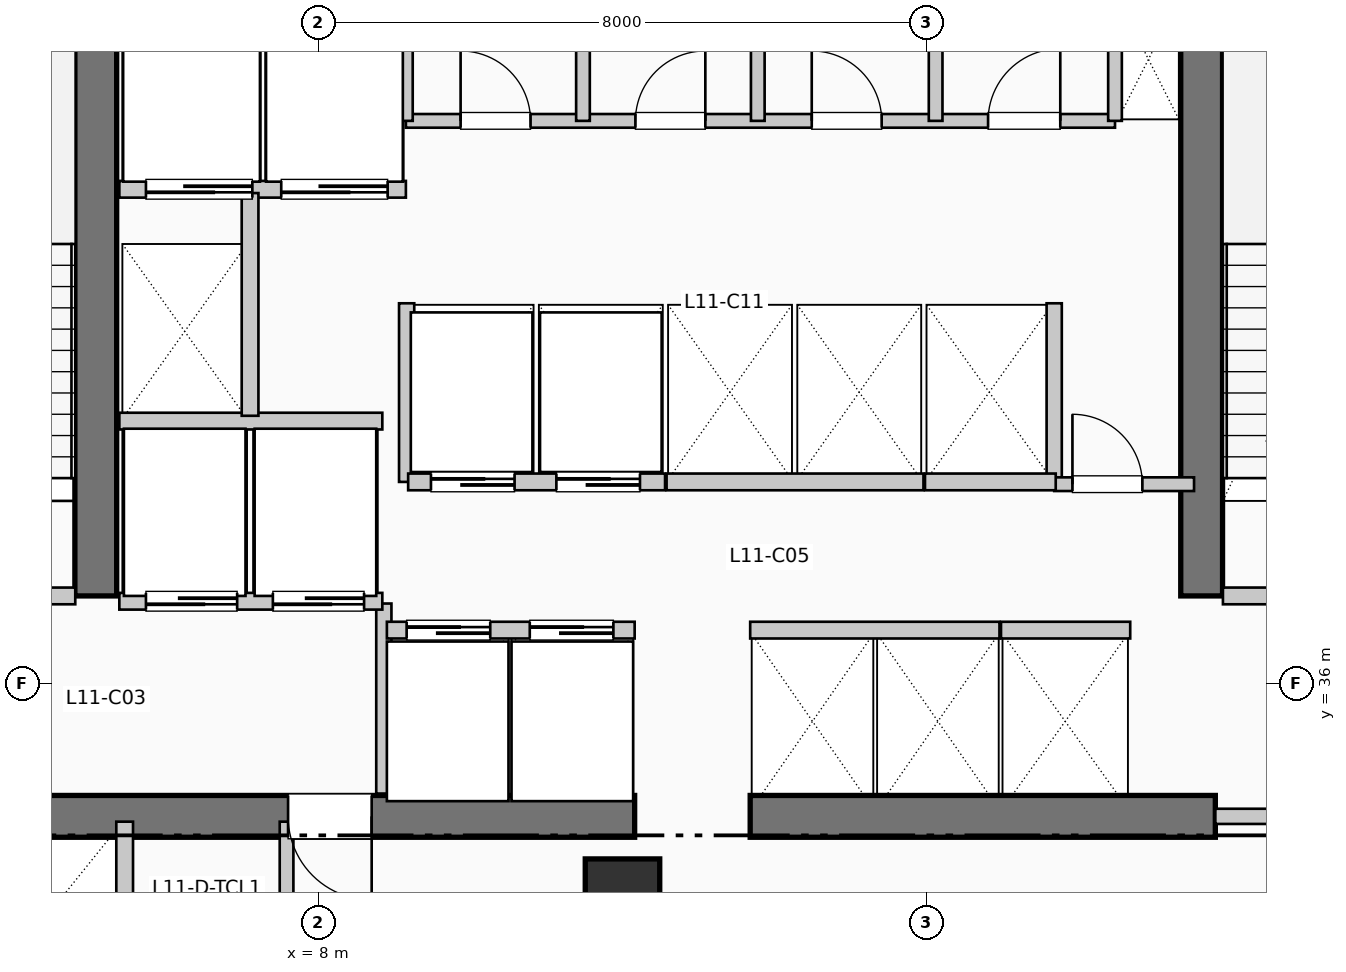
"""IFC4 building model, lengths in metres.
Left out: names, types, materials, properties, quantities, classifications, styles, units other than length and angle.
Written with IfcOpenShell. Run it as: python <this file> out.ifc"""

import sys

from ifc_helpers import new_model, si_unit, direction, frame, frame_2d, origin, origin_2d, place, context, subcontext, project, spatial, rectangle, extrude, element, fill, save


model = new_model("IFC4")
c1 = context("Model", 3, precision=1e-05, world=origin(), true_north=direction((0.0, 1.0)))
c2 = subcontext(c1, "Body", "Model", "MODEL_VIEW")
j1 = project(units=[si_unit("LENGTHUNIT", "METRE"), si_unit("PLANEANGLEUNIT", "RADIAN")], contexts=[c1])
p1 = place(None, origin())
s1 = spatial("IfcSite", under=j1, at=p1, CompositionType="ELEMENT")
p2 = place(p1, origin())
s2 = spatial("IfcBuilding", under=s1, at=p2, CompositionType="ELEMENT")
p3 = place(p2, frame((0.0, 0.0, 50.16)))
s3 = spatial("IfcBuildingStorey", under=s2, at=p3, CompositionType="ELEMENT", Elevation=50.16)
p4 = place(p3, frame((1.45, 34.25, 0.0), z_axis=(0.0, 0.0, 1.0), x_axis=(1.0, 0.0, 0.0)))
e1 = element("IfcWall", 1, at=p4, inside=s3, PredefinedType="SHEAR", context=c2, shape_type="SweptSolid", body=[
    extrude(rectangle(XDim=10.71, YDim=0.55, at=frame_2d((5.355, 0.0))), origin(), (0.0, 0.0, 1.0), 3.96),
])
p5 = place(p4, frame((7.25, 0.0, 0.0), z_axis=(0.0, 0.0, 1.0), x_axis=(-1.0, 0.0, 0.0)))
e2 = element("IfcOpeningElement", 2, at=p5, cuts=e1, PredefinedType="OPENING", context=c2, shape_type="SweptSolid", body=[
    extrude(rectangle(XDim=1.1, YDim=2.15, at=frame_2d((0.55, 1.075))), frame((0.0, 0.285, 0.0), z_axis=(0.0, -1.0, 0.0), x_axis=(1.0, 0.0, 0.0)), (0.0, 0.0, 1.0), 0.57),
])
p6 = place(p3, frame((13.68, 34.25, 0.0), z_axis=(0.0, 0.0, 1.0), x_axis=(1.0, 0.0, 0.0)))
e3 = element("IfcWall", 3, at=p6, inside=s3, PredefinedType="SHEAR", context=c2, shape_type="SweptSolid", body=[
    extrude(rectangle(XDim=6.12, YDim=0.55, at=frame_2d((3.06, 0.0))), origin(), (0.0, 0.0, 1.0), 3.96),
])
for number, where, z_axis, x_axis in (
    (4, (5.07, 37.15, 0.0), (0.0, 0.0, 1.0), (0.0, 1.0, 0.0)),
    (5, (19.62, 37.15, 0.0), (0.0, 0.0, 1.0), (0.0, 1.0, 0.0)),
):
    element("IfcWall", number, at=place(p3, frame(where, z_axis=z_axis, x_axis=x_axis)), inside=s3, PredefinedType="SHEAR", context=c2, shape_type="SweptSolid", body=[
        extrude(rectangle(XDim=7.89, YDim=0.55, at=frame_2d((3.945, 0.0))), origin(), (0.0, 0.0, 1.0), 3.96),
    ])
p7 = place(p3, frame((12.0, 33.2, 0.0), z_axis=(0.0, 0.0, 1.0), x_axis=(1.0, 0.0, 0.0)))
e6 = element("IfcColumn", 6, at=p7, inside=s3, PredefinedType="COLUMN", context=c2, shape_type="SweptSolid", body=[
    extrude(rectangle(XDim=0.98, YDim=0.98, at=origin_2d()), origin(), (0.0, 0.0, 1.0), 3.96),
])
p8 = place(p3, frame((1.65, 37.15, 0.0), z_axis=(0.0, 0.0, 1.0), x_axis=(1.0, 0.0, 0.0)))
e7 = element("IfcWall", 7, at=p8, inside=s3, PredefinedType="PARTITIONING", context=c2, shape_type="SweptSolid", body=[
    extrude(rectangle(XDim=3.15, YDim=0.22, at=frame_2d((1.575, 0.0))), origin(), (0.0, 0.0, 1.0), 3.71),
])
p9 = place(p8, frame((2.05, 0.0, 0.0), z_axis=(0.0, 0.0, 1.0), x_axis=(-1.0, 0.0, 0.0)))
e8 = element("IfcOpeningElement", 8, at=p9, cuts=e7, PredefinedType="OPENING", context=c2, shape_type="SweptSolid", body=[
    extrude(rectangle(XDim=1.05, YDim=2.15, at=frame_2d((0.525, 1.075))), frame((0.0, 0.12, 0.0), z_axis=(0.0, -1.0, 0.0), x_axis=(1.0, 0.0, 0.0)), (0.0, 0.0, 1.0), 0.24),
])
p10 = place(p3, frame((8.86, 34.55, 0.0), z_axis=(0.0, 0.0, 1.0), x_axis=(0.0, 1.0, 0.0)))
e9 = element("IfcWall", 9, at=p10, inside=s3, PredefinedType="PARTITIONING", context=c2, shape_type="SweptSolid", body=[
    extrude(rectangle(XDim=2.5, YDim=0.2, at=frame_2d((1.25, 0.0))), origin(), (0.0, 0.0, 1.0), 3.71),
])
p11 = place(p3, frame((19.9, 37.15, 0.0), z_axis=(0.0, 0.0, 1.0), x_axis=(1.0, 0.0, 0.0)))
e10 = element("IfcWall", 10, at=p11, inside=s3, PredefinedType="PARTITIONING", context=c2, shape_type="SweptSolid", body=[
    extrude(rectangle(XDim=3.15, YDim=0.22, at=frame_2d((1.575, 0.0))), origin(), (0.0, 0.0, 1.0), 3.71),
])
p12 = place(p11, frame((2.05, 0.0, 0.0), z_axis=(0.0, 0.0, 1.0), x_axis=(-1.0, 0.0, 0.0)))
e11 = element("IfcOpeningElement", 11, at=p12, cuts=e10, PredefinedType="OPENING", context=c2, shape_type="SweptSolid", body=[
    extrude(rectangle(XDim=1.05, YDim=2.15, at=frame_2d((0.525, 1.075))), frame((0.0, 0.12, 0.0), z_axis=(0.0, -1.0, 0.0), x_axis=(1.0, 0.0, 0.0)), (0.0, 0.0, 1.0), 0.24),
])
p13 = place(p3, frame((19.8, 34.25, 0.0), z_axis=(0.0, 0.0, 1.0), x_axis=(1.0, 0.0, 0.0)))
e12 = element("IfcWall", 12, at=p13, inside=s3, PredefinedType="PARTITIONING", context=c2, shape_type="SweptSolid", body=[
    extrude(rectangle(XDim=3.25, YDim=0.2, at=frame_2d((1.625, 0.0))), origin(), (0.0, 0.0, 1.0), 3.71),
])
p14 = place(p13, frame((2.15, 0.0, 0.0), z_axis=(0.0, 0.0, 1.0), x_axis=(-1.0, 0.0, 0.0)))
e13 = element("IfcOpeningElement", 13, at=p14, cuts=e12, PredefinedType="OPENING", context=c2, shape_type="SweptSolid", body=[
    extrude(rectangle(XDim=1.1, YDim=2.15, at=frame_2d((0.55, 1.075))), frame((0.0, 0.11, 0.0), z_axis=(0.0, -1.0, 0.0), x_axis=(1.0, 0.0, 0.0)), (0.0, 0.0, 1.0), 0.22),
])
p15 = place(p3, frame((5.38, 37.08, 0.0), z_axis=(0.0, 0.0, 1.0), x_axis=(1.0, 0.0, 0.0)))
e14 = element("IfcWall", 14, at=p15, inside=s3, PredefinedType="PARTITIONING", context=c2, shape_type="SweptSolid", body=[
    extrude(rectangle(XDim=3.46, YDim=0.22, at=frame_2d((1.73, 0.0))), origin(), (0.0, 0.0, 1.0), 3.71),
])
p16 = place(p15, frame((1.55, 0.0, 0.0), z_axis=(0.0, 0.0, 1.0), x_axis=(-1.0, 0.0, 0.0)))
e15 = element("IfcOpeningElement", 15, at=p16, cuts=e14, PredefinedType="OPENING", context=c2, shape_type="SweptSolid", body=[
    extrude(rectangle(XDim=1.2, YDim=2.2, at=frame_2d((0.6, 1.1))), frame((0.0, 0.12, 0.0), z_axis=(0.0, -1.0, 0.0), x_axis=(1.0, 0.0, 0.0)), (0.0, 0.0, 1.0), 0.24),
])
p17 = place(p15, frame((3.22, 0.0, 0.0), z_axis=(0.0, 0.0, 1.0), x_axis=(-1.0, 0.0, 0.0)))
e16 = element("IfcOpeningElement", 16, at=p17, cuts=e14, PredefinedType="OPENING", context=c2, shape_type="SweptSolid", body=[
    extrude(rectangle(XDim=1.2, YDim=2.2, at=frame_2d((0.6, 1.1))), frame((0.0, 0.12, 0.0), z_axis=(0.0, -1.0, 0.0), x_axis=(1.0, 0.0, 0.0)), (0.0, 0.0, 1.0), 0.24),
])
p18 = place(p3, frame((5.38, 39.45, 0.0), z_axis=(0.0, 0.0, 1.0), x_axis=(1.0, 0.0, 0.0)))
e17 = element("IfcWall", 17, at=p18, inside=s3, PredefinedType="PARTITIONING", context=c2, shape_type="SweptSolid", body=[
    extrude(rectangle(XDim=3.46, YDim=0.22, at=frame_2d((1.73, 0.0))), origin(), (0.0, 0.0, 1.0), 3.71),
])
p19 = place(p3, frame((5.38, 42.5, 0.0), z_axis=(0.0, 0.0, 1.0), x_axis=(1.0, 0.0, 0.0)))
e18 = element("IfcWall", 18, at=p19, inside=s3, PredefinedType="PARTITIONING", context=c2, shape_type="SweptSolid", body=[
    extrude(rectangle(XDim=3.77, YDim=0.22, at=frame_2d((1.885, 0.0))), origin(), (0.0, 0.0, 1.0), 3.71),
])
p20 = place(p19, frame((1.75, 0.0, 0.0), z_axis=(0.0, 0.0, 1.0), x_axis=(-1.0, 0.0, 0.0)))
e19 = element("IfcOpeningElement", 19, at=p20, cuts=e18, PredefinedType="OPENING", context=c2, shape_type="SweptSolid", body=[
    extrude(rectangle(XDim=1.4, YDim=2.2, at=frame_2d((0.7, 1.1))), frame((0.0, 0.12, 0.0), z_axis=(0.0, -1.0, 0.0), x_axis=(1.0, 0.0, 0.0)), (0.0, 0.0, 1.0), 0.24),
])
p21 = place(p19, frame((3.53, 0.0, 0.0), z_axis=(0.0, 0.0, 1.0), x_axis=(-1.0, 0.0, 0.0)))
e20 = element("IfcOpeningElement", 20, at=p21, cuts=e18, PredefinedType="OPENING", context=c2, shape_type="SweptSolid", body=[
    extrude(rectangle(XDim=1.4, YDim=2.2, at=frame_2d((0.7, 1.1))), frame((0.0, 0.12, 0.0), z_axis=(0.0, -1.0, 0.0), x_axis=(1.0, 0.0, 0.0)), (0.0, 0.0, 1.0), 0.24),
])
p22 = place(p3, frame((7.1, 39.52, 0.0), z_axis=(0.0, 0.0, 1.0), x_axis=(0.0, 1.0, 0.0)))
e21 = element("IfcWall", 21, at=p22, inside=s3, PredefinedType="PARTITIONING", context=c2, shape_type="SweptSolid", body=[
    extrude(rectangle(XDim=2.93, YDim=0.22, at=frame_2d((1.465, 0.0))), origin(), (0.0, 0.0, 1.0), 3.71),
])
p23 = place(p3, frame((5.45, 31.8, 0.0), z_axis=(0.0, 0.0, 1.0), x_axis=(0.0, 1.0, 0.0)))
e22 = element("IfcWall", 22, at=p23, inside=s3, PredefinedType="PARTITIONING", context=c2, shape_type="SweptSolid", body=[
    extrude(rectangle(XDim=2.38, YDim=0.22, at=frame_2d((1.19, 0.0))), origin(), (0.0, 0.0, 1.0), 3.71),
])
for number, where, z_axis, x_axis in (
    (23, (9.16, 38.65, 0.0), (0.0, 0.0, 1.0), (0.0, 1.0, 0.0)),
    (24, (17.68, 38.65, 0.0), (0.0, 0.0, 1.0), (0.0, 1.0, 0.0)),
):
    element("IfcWall", number, at=place(p3, frame(where, z_axis=z_axis, x_axis=x_axis)), inside=s3, PredefinedType="PARTITIONING", context=c2, shape_type="SweptSolid", body=[
        extrude(rectangle(XDim=2.35, YDim=0.2, at=frame_2d((1.175, 0.0))), origin(), (0.0, 0.0, 1.0), 3.71),
    ])
p24 = place(p3, frame((17.68, 38.62, 0.0), z_axis=(0.0, 0.0, 1.0), x_axis=(1.0, 0.0, 0.0)))
e25 = element("IfcWall", 25, at=p24, inside=s3, PredefinedType="PARTITIONING", context=c2, shape_type="SweptSolid", body=[
    extrude(rectangle(XDim=1.84, YDim=0.18, at=frame_2d((0.92, 0.0))), origin(), (0.0, 0.0, 1.0), 3.71),
])
p25 = place(p24, frame((0.24, 0.0, 0.0)))
e26 = element("IfcOpeningElement", 26, at=p25, cuts=e25, PredefinedType="OPENING", context=c2, shape_type="SweptSolid", body=[
    extrude(rectangle(XDim=0.92, YDim=2.1, at=frame_2d((0.46, 1.05))), frame((0.0, 0.1, 0.0), z_axis=(0.0, -1.0, 0.0), x_axis=(1.0, 0.0, 0.0)), (0.0, 0.0, 1.0), 0.2),
])
p26 = place(p3, frame((7.58, 31.82, 0.0), z_axis=(0.0, 0.0, 1.0), x_axis=(0.0, 1.0, 0.0)))
e27 = element("IfcWall", 27, at=p26, inside=s3, PredefinedType="PLUMBINGWALL", context=c2, shape_type="SweptSolid", body=[
    extrude(rectangle(XDim=2.36, YDim=0.18, at=frame_2d((1.18, 0.0))), origin(), (0.0, 0.0, 1.0), 3.71),
])
p27 = place(p3, frame((8.9, 36.7, 0.0), z_axis=(0.0, 0.0, 1.0), x_axis=(1.0, 0.0, 0.0)))
e28 = element("IfcWall", 28, at=p27, inside=s3, PredefinedType="PARTITIONING", context=c2, shape_type="SweptSolid", body=[
    extrude(rectangle(XDim=3.26, YDim=0.22, at=frame_2d((1.63, 0.0))), origin(), (0.0, 0.0, 1.0), 3.71),
])
p28 = place(p27, frame((0.26, 0.0, 0.0)))
e29 = element("IfcOpeningElement", 29, at=p28, cuts=e28, PredefinedType="OPENING", context=c2, shape_type="SweptSolid", body=[
    extrude(rectangle(XDim=1.1, YDim=2.2, at=frame_2d((0.55, 1.1))), frame((0.0, 0.12, 0.0), z_axis=(0.0, -1.0, 0.0), x_axis=(1.0, 0.0, 0.0)), (0.0, 0.0, 1.0), 0.24),
])
p29 = place(p27, frame((1.88, 0.0, 0.0)))
e30 = element("IfcOpeningElement", 30, at=p29, cuts=e28, PredefinedType="OPENING", context=c2, shape_type="SweptSolid", body=[
    extrude(rectangle(XDim=1.1, YDim=2.2, at=frame_2d((0.55, 1.1))), frame((0.0, 0.12, 0.0), z_axis=(0.0, -1.0, 0.0), x_axis=(1.0, 0.0, 0.0)), (0.0, 0.0, 1.0), 0.24),
])
p30 = place(p3, frame((9.18, 38.65, 0.0), z_axis=(0.0, 0.0, 1.0), x_axis=(1.0, 0.0, 0.0)))
e31 = element("IfcWall", 31, at=p30, inside=s3, PredefinedType="PARTITIONING", context=c2, shape_type="SweptSolid", body=[
    extrude(rectangle(XDim=3.38, YDim=0.22, at=frame_2d((1.69, 0.0))), origin(), (0.0, 0.0, 1.0), 3.71),
])
p31 = place(p30, frame((0.3, 0.0, 0.0)))
e32 = element("IfcOpeningElement", 32, at=p31, cuts=e31, PredefinedType="OPENING", context=c2, shape_type="SweptSolid", body=[
    extrude(rectangle(XDim=1.1, YDim=2.2, at=frame_2d((0.55, 1.1))), frame((0.0, 0.12, 0.0), z_axis=(0.0, -1.0, 0.0), x_axis=(1.0, 0.0, 0.0)), (0.0, 0.0, 1.0), 0.24),
])
p32 = place(p30, frame((1.95, 0.0, 0.0)))
e33 = element("IfcOpeningElement", 33, at=p32, cuts=e31, PredefinedType="OPENING", context=c2, shape_type="SweptSolid", body=[
    extrude(rectangle(XDim=1.1, YDim=2.2, at=frame_2d((0.55, 1.1))), frame((0.0, 0.12, 0.0), z_axis=(0.0, -1.0, 0.0), x_axis=(1.0, 0.0, 0.0)), (0.0, 0.0, 1.0), 0.24),
])
p33 = place(p3, frame((13.68, 36.7, 0.0), z_axis=(0.0, 0.0, 1.0), x_axis=(1.0, 0.0, 0.0)))
e34 = element("IfcWall", 34, at=p33, inside=s3, PredefinedType="PARTITIONING", context=c2, shape_type="SweptSolid", body=[
    extrude(rectangle(XDim=3.28, YDim=0.22, at=frame_2d((1.64, 0.0))), origin(), (0.0, 0.0, 1.0), 3.71),
])
p34 = place(p3, frame((12.58, 38.65, 0.0), z_axis=(0.0, 0.0, 1.0), x_axis=(1.0, 0.0, 0.0)))
e35 = element("IfcWall", 35, at=p34, inside=s3, PredefinedType="PARTITIONING", context=c2, shape_type="SweptSolid", body=[
    extrude(rectangle(XDim=3.38, YDim=0.22, at=frame_2d((1.69, 0.0))), origin(), (0.0, 0.0, 1.0), 3.71),
])
p35 = place(p3, frame((16.98, 36.7, 0.0), z_axis=(0.0, 0.0, 1.0), x_axis=(1.0, 0.0, 0.0)))
e36 = element("IfcWall", 36, at=p35, inside=s3, PredefinedType="PARTITIONING", context=c2, shape_type="SweptSolid", body=[
    extrude(rectangle(XDim=1.7, YDim=0.22, at=frame_2d((0.85, 0.0))), origin(), (0.0, 0.0, 1.0), 3.71),
])
p36 = place(p3, frame((15.98, 38.65, 0.0), z_axis=(0.0, 0.0, 1.0), x_axis=(1.0, 0.0, 0.0)))
e37 = element("IfcWall", 37, at=p36, inside=s3, PredefinedType="PARTITIONING", context=c2, shape_type="SweptSolid", body=[
    extrude(rectangle(XDim=1.72, YDim=0.22, at=frame_2d((0.86, 0.0))), origin(), (0.0, 0.0, 1.0), 3.71),
])
p37 = place(p3, frame((9.15, 43.4, 0.0), z_axis=(0.0, 0.0, 1.0), x_axis=(1.0, 0.0, 0.0)))
e38 = element("IfcWall", 38, at=p37, inside=s3, PredefinedType="PLUMBINGWALL", context=c2, shape_type="SweptSolid", body=[
    extrude(rectangle(XDim=9.33, YDim=0.18, at=frame_2d((4.665, 0.0))), origin(), (0.0, 0.0, 1.0), 3.71),
])
p38 = place(p37, frame((0.72, 0.0, 0.0)))
e39 = element("IfcOpeningElement", 39, at=p38, cuts=e38, PredefinedType="OPENING", context=c2, shape_type="SweptSolid", body=[
    extrude(rectangle(XDim=0.92, YDim=2.1, at=frame_2d((0.46, 1.05))), frame((0.0, 0.1, 0.0), z_axis=(0.0, -1.0, 0.0), x_axis=(1.0, 0.0, 0.0)), (0.0, 0.0, 1.0), 0.2),
])
p39 = place(p37, frame((3.02, 0.0, 0.0)))
e40 = element("IfcOpeningElement", 40, at=p39, cuts=e38, PredefinedType="OPENING", context=c2, shape_type="SweptSolid", body=[
    extrude(rectangle(XDim=0.92, YDim=2.1, at=frame_2d((0.46, 1.05))), frame((0.0, 0.1, 0.0), z_axis=(0.0, -1.0, 0.0), x_axis=(1.0, 0.0, 0.0)), (0.0, 0.0, 1.0), 0.2),
])
p40 = place(p37, frame((5.34, 0.0, 0.0)))
e41 = element("IfcOpeningElement", 41, at=p40, cuts=e38, PredefinedType="OPENING", context=c2, shape_type="SweptSolid", body=[
    extrude(rectangle(XDim=0.92, YDim=2.1, at=frame_2d((0.46, 1.05))), frame((0.0, 0.1, 0.0), z_axis=(0.0, -1.0, 0.0), x_axis=(1.0, 0.0, 0.0)), (0.0, 0.0, 1.0), 0.2),
])
p41 = place(p37, frame((7.66, 0.0, 0.0)))
e42 = element("IfcOpeningElement", 42, at=p41, cuts=e38, PredefinedType="OPENING", context=c2, shape_type="SweptSolid", body=[
    extrude(rectangle(XDim=0.95, YDim=2.1, at=frame_2d((0.475, 1.05))), frame((0.0, 0.1, 0.0), z_axis=(0.0, -1.0, 0.0), x_axis=(1.0, 0.0, 0.0)), (0.0, 0.0, 1.0), 0.2),
])
for number, where, z_axis, x_axis in (
    (43, (9.15, 43.4, 0.0), (0.0, 0.0, 1.0), (0.0, 1.0, 0.0)),
    (44, (18.48, 43.4, 0.0), (0.0, 0.0, 1.0), (0.0, 1.0, 0.0)),
    (45, (11.48, 43.4, 0.0), (0.0, 0.0, 1.0), (0.0, 1.0, 0.0)),
    (46, (13.78, 43.4, 0.0), (0.0, 0.0, 1.0), (0.0, 1.0, 0.0)),
    (47, (16.12, 43.4, 0.0), (0.0, 0.0, 1.0), (0.0, 1.0, 0.0)),
):
    element("IfcWall", number, at=place(p3, frame(where, z_axis=z_axis, x_axis=x_axis)), inside=s3, PredefinedType="PLUMBINGWALL", context=c2, shape_type="SweptSolid", body=[
        extrude(rectangle(XDim=1.88, YDim=0.18, at=frame_2d((0.94, 0.0))), origin(), (0.0, 0.0, 1.0), 3.71),
    ])
p42 = place(p5, origin())
e48 = element("IfcDoor", 48, at=p42, inside=s3, OperationType="SINGLE_SWING_RIGHT", PredefinedType="DOOR", context=c2, shape_type="SweptSolid", body=[
    extrude(rectangle(XDim=1.1, YDim=2.15, at=frame_2d((0.55, 1.075))), frame((0.0, 0.025, 0.0), z_axis=(0.0, -1.0, 0.0), x_axis=(1.0, 0.0, 0.0)), (0.0, 0.0, 1.0), 0.05),
])
fill(e2, e48)
p43 = place(p16, origin())
e49 = element("IfcDoor", 49, at=p43, inside=s3, OperationType="SLIDING_TO_RIGHT", PredefinedType="DOOR", context=c2, shape_type="SweptSolid", body=[
    extrude(rectangle(XDim=1.2, YDim=2.2, at=frame_2d((0.6, 1.1))), frame((0.0, 0.025, 0.0), z_axis=(0.0, -1.0, 0.0), x_axis=(1.0, 0.0, 0.0)), (0.0, 0.0, 1.0), 0.05),
])
fill(e15, e49)
p44 = place(p17, origin())
e50 = element("IfcDoor", 50, at=p44, inside=s3, OperationType="SLIDING_TO_RIGHT", PredefinedType="DOOR", context=c2, shape_type="SweptSolid", body=[
    extrude(rectangle(XDim=1.2, YDim=2.2, at=frame_2d((0.6, 1.1))), frame((0.0, 0.025, 0.0), z_axis=(0.0, -1.0, 0.0), x_axis=(1.0, 0.0, 0.0)), (0.0, 0.0, 1.0), 0.05),
])
fill(e16, e50)
p45 = place(p20, origin())
e51 = element("IfcDoor", 51, at=p45, inside=s3, OperationType="SLIDING_TO_LEFT", PredefinedType="DOOR", context=c2, shape_type="SweptSolid", body=[
    extrude(rectangle(XDim=1.4, YDim=2.2, at=frame_2d((0.7, 1.1))), frame((0.0, 0.025, 0.0), z_axis=(0.0, -1.0, 0.0), x_axis=(1.0, 0.0, 0.0)), (0.0, 0.0, 1.0), 0.05),
])
fill(e19, e51)
p46 = place(p21, origin())
e52 = element("IfcDoor", 52, at=p46, inside=s3, OperationType="SLIDING_TO_LEFT", PredefinedType="DOOR", context=c2, shape_type="SweptSolid", body=[
    extrude(rectangle(XDim=1.4, YDim=2.2, at=frame_2d((0.7, 1.1))), frame((0.0, 0.025, 0.0), z_axis=(0.0, -1.0, 0.0), x_axis=(1.0, 0.0, 0.0)), (0.0, 0.0, 1.0), 0.05),
])
fill(e20, e52)
p47 = place(p25, origin())
e53 = element("IfcDoor", 53, at=p47, inside=s3, OperationType="SINGLE_SWING_LEFT", PredefinedType="DOOR", context=c2, shape_type="SweptSolid", body=[
    extrude(rectangle(XDim=0.92, YDim=2.1, at=frame_2d((0.46, 1.05))), frame((0.0, 0.025, 0.0), z_axis=(0.0, -1.0, 0.0), x_axis=(1.0, 0.0, 0.0)), (0.0, 0.0, 1.0), 0.05),
])
fill(e26, e53)
p48 = place(p28, origin())
e54 = element("IfcDoor", 54, at=p48, inside=s3, OperationType="SLIDING_TO_LEFT", PredefinedType="DOOR", context=c2, shape_type="SweptSolid", body=[
    extrude(rectangle(XDim=1.1, YDim=2.2, at=frame_2d((0.55, 1.1))), frame((0.0, 0.025, 0.0), z_axis=(0.0, -1.0, 0.0), x_axis=(1.0, 0.0, 0.0)), (0.0, 0.0, 1.0), 0.05),
])
fill(e29, e54)
p49 = place(p29, origin())
e55 = element("IfcDoor", 55, at=p49, inside=s3, OperationType="SLIDING_TO_LEFT", PredefinedType="DOOR", context=c2, shape_type="SweptSolid", body=[
    extrude(rectangle(XDim=1.1, YDim=2.2, at=frame_2d((0.55, 1.1))), frame((0.0, 0.025, 0.0), z_axis=(0.0, -1.0, 0.0), x_axis=(1.0, 0.0, 0.0)), (0.0, 0.0, 1.0), 0.05),
])
fill(e30, e55)
p50 = place(p31, origin())
e56 = element("IfcDoor", 56, at=p50, inside=s3, OperationType="SLIDING_TO_LEFT", PredefinedType="DOOR", context=c2, shape_type="SweptSolid", body=[
    extrude(rectangle(XDim=1.1, YDim=2.2, at=frame_2d((0.55, 1.1))), frame((0.0, 0.025, 0.0), z_axis=(0.0, -1.0, 0.0), x_axis=(1.0, 0.0, 0.0)), (0.0, 0.0, 1.0), 0.05),
])
fill(e32, e56)
p51 = place(p32, origin())
e57 = element("IfcDoor", 57, at=p51, inside=s3, OperationType="SLIDING_TO_LEFT", PredefinedType="DOOR", context=c2, shape_type="SweptSolid", body=[
    extrude(rectangle(XDim=1.1, YDim=2.2, at=frame_2d((0.55, 1.1))), frame((0.0, 0.025, 0.0), z_axis=(0.0, -1.0, 0.0), x_axis=(1.0, 0.0, 0.0)), (0.0, 0.0, 1.0), 0.05),
])
fill(e33, e57)
p52 = place(p38, origin())
e58 = element("IfcDoor", 58, at=p52, inside=s3, OperationType="SINGLE_SWING_LEFT", PredefinedType="DOOR", context=c2, shape_type="SweptSolid", body=[
    extrude(rectangle(XDim=0.92, YDim=2.1, at=frame_2d((0.46, 1.05))), frame((0.0, 0.025, 0.0), z_axis=(0.0, -1.0, 0.0), x_axis=(1.0, 0.0, 0.0)), (0.0, 0.0, 1.0), 0.05),
])
fill(e39, e58)
p53 = place(p39, origin())
e59 = element("IfcDoor", 59, at=p53, inside=s3, OperationType="SINGLE_SWING_RIGHT", PredefinedType="DOOR", context=c2, shape_type="SweptSolid", body=[
    extrude(rectangle(XDim=0.92, YDim=2.1, at=frame_2d((0.46, 1.05))), frame((0.0, 0.025, 0.0), z_axis=(0.0, -1.0, 0.0), x_axis=(1.0, 0.0, 0.0)), (0.0, 0.0, 1.0), 0.05),
])
fill(e40, e59)
p54 = place(p40, origin())
e60 = element("IfcDoor", 60, at=p54, inside=s3, OperationType="SINGLE_SWING_LEFT", PredefinedType="DOOR", context=c2, shape_type="SweptSolid", body=[
    extrude(rectangle(XDim=0.92, YDim=2.1, at=frame_2d((0.46, 1.05))), frame((0.0, 0.025, 0.0), z_axis=(0.0, -1.0, 0.0), x_axis=(1.0, 0.0, 0.0)), (0.0, 0.0, 1.0), 0.05),
])
fill(e41, e60)
p55 = place(p41, origin())
e61 = element("IfcDoor", 61, at=p55, inside=s3, OperationType="SINGLE_SWING_RIGHT", PredefinedType="DOOR", context=c2, shape_type="SweptSolid", body=[
    extrude(rectangle(XDim=0.95, YDim=2.1, at=frame_2d((0.475, 1.05))), frame((0.0, 0.025, 0.0), z_axis=(0.0, -1.0, 0.0), x_axis=(1.0, 0.0, 0.0)), (0.0, 0.0, 1.0), 0.05),
])
fill(e42, e61)
save(model, sys.argv[1])
